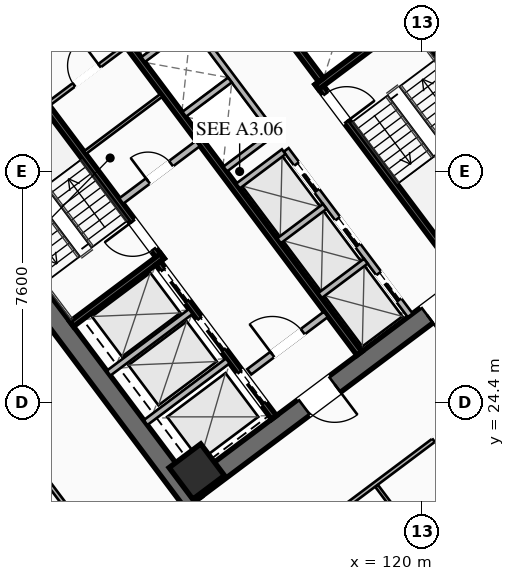
"""IFC4 building model, lengths in metres.
Left out: names, types, materials, properties, quantities, classifications, styles, units other than length and angle.
Written with IfcOpenShell. Run it as: python <this file> out.ifc"""

import sys

from ifc_helpers import new_model, si_unit, direction, frame, frame_2d, origin, origin_2d, place, context, subcontext, project, spatial, rectangle, hollow_rectangle, extrude, element, fill, save


model = new_model("IFC4")
c1 = context("Model", 3, precision=1e-05, world=origin(), true_north=direction((0.0, 1.0)))
c2 = subcontext(c1, "Body", "Model", "MODEL_VIEW")
j1 = project(units=[si_unit("LENGTHUNIT", "METRE"), si_unit("PLANEANGLEUNIT", "RADIAN")], contexts=[c1])
p1 = place(None, origin())
s1 = spatial("IfcSite", under=j1, at=p1, CompositionType="ELEMENT")
p2 = place(p1, origin())
s2 = spatial("IfcBuilding", under=s1, at=p2, CompositionType="ELEMENT")
p3 = place(p2, frame((0.0, 0.0, 42.35)))
s3 = spatial("IfcBuildingStorey", under=s2, at=p3, CompositionType="ELEMENT", Elevation=42.35)
for number, where, z_axis, x_axis in (
    (1, (112.476, 21.107, 0.0), (0.0, 0.0, 1.0), (-0.6, 0.8, 0.0)),
    (2, (115.524, 42.893, 0.0), (0.0, 0.0, 1.0), (0.6, -0.8, 0.0)),
):
    element("IfcWall", number, at=place(p3, frame(where, z_axis=z_axis, x_axis=x_axis)), inside=s3, PredefinedType="SHEAR", context=c2, shape_type="SweptSolid", body=[
        extrude(rectangle(XDim=15.6, YDim=0.65, at=frame_2d((7.8, 0.0))), origin(), (0.0, 0.0, 1.0), 3.55),
    ])
p4 = place(p3, frame((124.429, 30.478, 0.0), z_axis=(0.0, 0.0, 1.0), x_axis=(-0.799998028465, -0.600002628705, 0.0)))
e3 = element("IfcWall", 3, at=p4, inside=s3, PredefinedType="SHEAR", context=c2, shape_type="SweptSolid", body=[
    extrude(rectangle(XDim=14.86, YDim=0.65, at=frame_2d((7.43, 0.0))), origin(), (0.0, 0.0, 1.0), 3.55),
])
p5 = place(p4, frame((9.13, 0.0, 0.0)))
e4 = element("IfcOpeningElement", 4, at=p5, cuts=e3, PredefinedType="OPENING", context=c2, shape_type="SweptSolid", body=[
    extrude(rectangle(XDim=1.25, YDim=2.25, at=frame_2d((0.625, 1.125))), frame((0.0, 0.335, 0.0), z_axis=(0.0, -1.0, 0.0), x_axis=(1.0, 0.0, 0.0)), (0.0, 0.0, 1.0), 0.67),
])
p6 = place(p4, frame((4.08, 0.0, 0.0)))
e5 = element("IfcOpeningElement", 5, at=p6, cuts=e3, PredefinedType="OPENING", context=c2, shape_type="SweptSolid", body=[
    extrude(rectangle(XDim=1.25, YDim=2.25, at=frame_2d((0.625, 1.125))), frame((0.0, 0.335, 0.0), z_axis=(0.0, -1.0, 0.0), x_axis=(1.0, 0.0, 0.0)), (0.0, 0.0, 1.0), 0.67),
])
p7 = place(p3, frame((103.571, 33.522, 0.0), z_axis=(0.0, 0.0, 1.0), x_axis=(0.799998028465, 0.600002628705, 0.0)))
e6 = element("IfcWall", 6, at=p7, inside=s3, PredefinedType="SHEAR", context=c2, shape_type="SweptSolid", body=[
    extrude(rectangle(XDim=14.86, YDim=0.65, at=frame_2d((7.43, 0.0))), origin(), (0.0, 0.0, 1.0), 3.55),
])
p8 = place(p7, frame((4.48, 0.0, 0.0)))
e7 = element("IfcOpeningElement", 7, at=p8, cuts=e6, PredefinedType="OPENING", context=c2, shape_type="SweptSolid", body=[
    extrude(rectangle(XDim=1.25, YDim=2.25, at=frame_2d((0.625, 1.125))), frame((0.0, 0.335, 0.0), z_axis=(0.0, -1.0, 0.0), x_axis=(1.0, 0.0, 0.0)), (0.0, 0.0, 1.0), 0.67),
])
p9 = place(p7, frame((9.53, 0.0, 0.0)))
e8 = element("IfcOpeningElement", 8, at=p9, cuts=e6, PredefinedType="OPENING", context=c2, shape_type="SweptSolid", body=[
    extrude(rectangle(XDim=1.25, YDim=2.25, at=frame_2d((0.625, 1.125))), frame((0.0, 0.335, 0.0), z_axis=(0.0, -1.0, 0.0), x_axis=(1.0, 0.0, 0.0)), (0.0, 0.0, 1.0), 0.67),
])
p10 = place(p3, frame((112.59, 22.13, 0.0), z_axis=(0.0, 0.0, 1.0), x_axis=(0.799999996291, 0.600000004945, 0.0)))
e9 = element("IfcColumn", 9, at=p10, inside=s3, PredefinedType="COLUMN", context=c2, shape_type="SweptSolid", body=[
    extrude(hollow_rectangle(XDim=1.3, YDim=1.3, WallThickness=0.05, at=origin_2d()), origin(), (0.0, 0.0, 1.0), 3.35),
])
p11 = place(p3, frame((111.44, 29.08, 0.0), z_axis=(0.0, 0.0, 1.0), x_axis=(-0.600009827119, 0.799992629566, 0.0)))
e10 = element("IfcWall", 10, at=p11, inside=s3, PredefinedType="SHEAR", context=c2, shape_type="SweptSolid", body=[
    extrude(rectangle(XDim=7.95, YDim=0.2, at=frame_2d((3.975, 0.0))), origin(), (0.0, 0.0, 1.0), 3.35),
])
p12 = place(p11, frame((0.45, 0.0, 0.0)))
e11 = element("IfcOpeningElement", 11, at=p12, cuts=e10, PredefinedType="OPENING", context=c2, shape_type="SweptSolid", body=[
    extrude(rectangle(XDim=1.15, YDim=2.2, at=frame_2d((0.575, 1.1))), frame((0.0, 0.11, 0.0), z_axis=(0.0, -1.0, 0.0), x_axis=(1.0, 0.0, 0.0)), (0.0, 0.0, 1.0), 0.22),
])
p13 = place(p3, frame((108.476, 26.982, 0.0), z_axis=(0.0, 0.0, 1.0), x_axis=(0.799984290658, 0.600020945218, 0.0)))
e12 = element("IfcWall", 12, at=p13, inside=s3, PredefinedType="SHEAR", context=c2, shape_type="SweptSolid", body=[
    extrude(rectangle(XDim=3.73, YDim=0.2, at=frame_2d((1.865, 0.0))), origin(), (0.0, 0.0, 1.0), 3.35),
])
p14 = place(p3, frame((116.56, 34.92, 0.0), z_axis=(0.0, 0.0, 1.0), x_axis=(0.600009827119, -0.799992629566, 0.0)))
e13 = element("IfcWall", 13, at=p14, inside=s3, PredefinedType="SHEAR", context=c2, shape_type="SweptSolid", body=[
    extrude(rectangle(XDim=7.95, YDim=0.2, at=frame_2d((3.975, 0.0))), origin(), (0.0, 0.0, 1.0), 3.35),
])
p15 = place(p14, frame((0.45, 0.0, 0.0)))
e14 = element("IfcOpeningElement", 14, at=p15, cuts=e13, PredefinedType="OPENING", context=c2, shape_type="SweptSolid", body=[
    extrude(rectangle(XDim=1.15, YDim=2.2, at=frame_2d((0.575, 1.1))), frame((0.0, 0.11, 0.0), z_axis=(0.0, -1.0, 0.0), x_axis=(1.0, 0.0, 0.0)), (0.0, 0.0, 1.0), 0.22),
])
p16 = place(p3, frame((116.54, 34.78, 0.0), z_axis=(0.0, 0.0, 1.0), x_axis=(0.799984290658, 0.600020945218, 0.0)))
e15 = element("IfcWall", 15, at=p16, inside=s3, PredefinedType="SHEAR", context=c2, shape_type="SweptSolid", body=[
    extrude(rectangle(XDim=3.73, YDim=0.2, at=frame_2d((1.865, 0.0))), origin(), (0.0, 0.0, 1.0), 3.35),
])
p17 = place(p3, frame((117.938, 26.016, 0.0), z_axis=(0.0, 0.0, 1.0), x_axis=(-0.600005463273, 0.799995902516, 0.0)))
e16 = element("IfcWall", 16, at=p17, inside=s3, PredefinedType="SHEAR", context=c2, shape_type="SweptSolid", body=[
    extrude(rectangle(XDim=14.3, YDim=0.2, at=frame_2d((7.15, 0.0))), origin(), (0.0, 0.0, 1.0), 3.35),
])
p18 = place(p3, frame((110.104, 31.028, 0.0), z_axis=(0.0, 0.0, 1.0), x_axis=(0.800018601094, 0.59997519774, 0.0)))
e17 = element("IfcWall", 17, at=p18, inside=s3, PredefinedType="SOLIDWALL", context=c2, shape_type="SweptSolid", body=[
    extrude(rectangle(XDim=3.15, YDim=0.22, at=frame_2d((1.575, 0.0))), origin(), (0.0, 0.0, 1.0), 2.703),
])
p19 = place(p18, frame((1.1, 0.0, 0.0)))
e18 = element("IfcOpeningElement", 18, at=p19, cuts=e17, PredefinedType="OPENING", context=c2, shape_type="SweptSolid", body=[
    extrude(rectangle(XDim=0.95, YDim=2.05, at=frame_2d((0.475, 1.025))), frame((0.0, 0.12, 0.0), z_axis=(0.0, -1.0, 0.0), x_axis=(1.0, 0.0, 0.0)), (0.0, 0.0, 1.0), 0.24),
])
p20 = place(p3, frame((114.316, 25.412, 0.0), z_axis=(0.0, 0.0, 1.0), x_axis=(0.800018601094, 0.59997519774, 0.0)))
e19 = element("IfcWall", 19, at=p20, inside=s3, PredefinedType="SOLIDWALL", context=c2, shape_type="SweptSolid", body=[
    extrude(rectangle(XDim=3.15, YDim=0.22, at=frame_2d((1.575, 0.0))), origin(), (0.0, 0.0, 1.0), 2.703),
])
p21 = place(p20, frame((0.95, 0.0, 0.0)))
e20 = element("IfcOpeningElement", 20, at=p21, cuts=e19, PredefinedType="OPENING", context=c2, shape_type="SweptSolid", body=[
    extrude(rectangle(XDim=1.25, YDim=2.25, at=frame_2d((0.625, 1.125))), frame((0.0, 0.12, 0.0), z_axis=(0.0, -1.0, 0.0), x_axis=(1.0, 0.0, 0.0)), (0.0, 0.0, 1.0), 0.24),
])
p22 = place(p3, frame((115.13, 23.91, 0.0), z_axis=(0.0, 0.0, 1.0), x_axis=(-0.599975393228, 0.800018454488, 0.0)))
e21 = element("IfcWall", 21, at=p22, inside=s3, PredefinedType="SHEAR", context=c2, shape_type="SweptSolid", body=[
    extrude(rectangle(XDim=6.35, YDim=0.2, at=frame_2d((3.175, 0.0))), origin(), (0.0, 0.0, 1.0), 3.35),
])
p23 = place(p22, frame((4.775, 0.0, 0.0)))
e22 = element("IfcOpeningElement", 22, at=p23, cuts=e21, PredefinedType="OPENING", context=c2, shape_type="SweptSolid", body=[
    extrude(rectangle(XDim=1.3, YDim=2.25, at=frame_2d((0.65, 1.125))), frame((0.0, 0.11, 0.0), z_axis=(0.0, -1.0, 0.0), x_axis=(1.0, 0.0, 0.0)), (0.0, 0.0, 1.0), 0.22),
])
p24 = place(p22, frame((2.775, 0.0, 0.0)))
e23 = element("IfcOpeningElement", 23, at=p24, cuts=e21, PredefinedType="OPENING", context=c2, shape_type="SweptSolid", body=[
    extrude(rectangle(XDim=1.3, YDim=2.25, at=frame_2d((0.65, 1.125))), frame((0.0, 0.11, 0.0), z_axis=(0.0, -1.0, 0.0), x_axis=(1.0, 0.0, 0.0)), (0.0, 0.0, 1.0), 0.22),
])
p25 = place(p22, frame((0.575, 0.0, 0.0)))
e24 = element("IfcOpeningElement", 24, at=p25, cuts=e21, PredefinedType="OPENING", context=c2, shape_type="SweptSolid", body=[
    extrude(rectangle(XDim=1.3, YDim=2.25, at=frame_2d((0.65, 1.125))), frame((0.0, 0.11, 0.0), z_axis=(0.0, -1.0, 0.0), x_axis=(1.0, 0.0, 0.0)), (0.0, 0.0, 1.0), 0.22),
])
for number, where, z_axis, x_axis in (
    (25, (110.906, 23.742, 0.0), (0.0, 0.0, 1.0), (0.8, 0.6, 0.0)),
    (26, (109.688, 25.366, 0.0), (0.0, 0.0, 1.0), (0.8, 0.6, 0.0)),
):
    element("IfcWall", number, at=place(p3, frame(where, z_axis=z_axis, x_axis=x_axis)), inside=s3, PredefinedType="SOLIDWALL", context=c2, shape_type="SweptSolid", body=[
        extrude(rectangle(XDim=3.38, YDim=0.2, at=frame_2d((1.69, 0.0))), origin(), (0.0, 0.0, 1.0), 3.35),
    ])
p26 = place(p3, frame((112.87, 40.09, 0.0), z_axis=(0.0, 0.0, 1.0), x_axis=(0.599975393228, -0.800018454488, 0.0)))
e27 = element("IfcWall", 27, at=p26, inside=s3, PredefinedType="SHEAR", context=c2, shape_type="SweptSolid", body=[
    extrude(rectangle(XDim=6.35, YDim=0.2, at=frame_2d((3.175, 0.0))), origin(), (0.0, 0.0, 1.0), 3.35),
])
p27 = place(p3, frame((107.71, 34.22, 0.0), z_axis=(0.0, 0.0, 1.0), x_axis=(0.799981399002, 0.60002480053, 0.0)))
e28 = element("IfcWall", 28, at=p27, inside=s3, PredefinedType="PARTITIONING", context=c2, shape_type="SweptSolid", body=[
    extrude(rectangle(XDim=3.15, YDim=0.135, at=frame_2d((1.575, 0.0))), origin(), (0.0, 0.0, 1.0), 2.703),
])
p28 = place(p27, frame((1.05, 0.0, 0.0)))
e29 = element("IfcOpeningElement", 29, at=p28, cuts=e28, PredefinedType="OPENING", context=c2, shape_type="SweptSolid", body=[
    extrude(rectangle(XDim=1.05, YDim=2.2, at=frame_2d((0.525, 1.1))), frame((0.0, 0.077, 0.0), z_axis=(0.0, -1.0, 0.0), x_axis=(1.0, 0.0, 0.0)), (0.0, 0.0, 1.0), 0.155),
])
p29 = place(p3, frame((108.91, 32.62, 0.0), z_axis=(0.0, 0.0, 1.0), x_axis=(0.800018601094, 0.59997519774, 0.0)))
e30 = element("IfcWall", 30, at=p29, inside=s3, PredefinedType="PARTITIONING", context=c2, shape_type="SweptSolid", body=[
    extrude(rectangle(XDim=3.15, YDim=0.11, at=frame_2d((1.575, 0.0))), origin(), (0.0, 0.0, 1.0), 2.703),
])
p30 = place(p3, frame((119.61, 27.27, 0.0), z_axis=(0.0, 0.0, 1.0), x_axis=(-0.600011488909, 0.79999138319, 0.0)))
e31 = element("IfcWall", 31, at=p30, inside=s3, PredefinedType="SOLIDWALL", context=c2, shape_type="SweptSolid", body=[
    extrude(rectangle(XDim=6.8, YDim=0.2, at=frame_2d((3.4, 0.0))), origin(), (0.0, 0.0, 1.0), 3.35),
])
p31 = place(p30, frame((0.625, 0.0, 0.0)))
e32 = element("IfcOpeningElement", 32, at=p31, cuts=e31, PredefinedType="OPENING", context=c2, shape_type="SweptSolid", body=[
    extrude(rectangle(XDim=1.1, YDim=2.2, at=frame_2d((0.55, 1.1))), frame((0.0, 0.11, 0.0), z_axis=(0.0, -1.0, 0.0), x_axis=(1.0, 0.0, 0.0)), (0.0, 0.0, 1.0), 0.22),
])
p32 = place(p30, frame((2.875, 0.0, 0.0)))
e33 = element("IfcOpeningElement", 33, at=p32, cuts=e31, PredefinedType="OPENING", context=c2, shape_type="SweptSolid", body=[
    extrude(rectangle(XDim=1.1, YDim=2.2, at=frame_2d((0.55, 1.1))), frame((0.0, 0.11, 0.0), z_axis=(0.0, -1.0, 0.0), x_axis=(1.0, 0.0, 0.0)), (0.0, 0.0, 1.0), 0.22),
])
p33 = place(p30, frame((5.125, 0.0, 0.0)))
e34 = element("IfcOpeningElement", 34, at=p33, cuts=e31, PredefinedType="OPENING", context=c2, shape_type="SweptSolid", body=[
    extrude(rectangle(XDim=1.1, YDim=2.2, at=frame_2d((0.55, 1.1))), frame((0.0, 0.11, 0.0), z_axis=(0.0, -1.0, 0.0), x_axis=(1.0, 0.0, 0.0)), (0.0, 0.0, 1.0), 0.22),
])
p34 = place(p3, frame((116.646, 27.922, 0.0), z_axis=(0.0, 0.0, 1.0), x_axis=(0.8, 0.6, 0.0)))
e35 = element("IfcWall", 35, at=p34, inside=s3, PredefinedType="SOLIDWALL", context=c2, shape_type="SweptSolid", body=[
    extrude(rectangle(XDim=1.88, YDim=0.2, at=frame_2d((0.94, 0.0))), origin(), (0.0, 0.0, 1.0), 3.35),
])
p35 = place(p3, frame((115.296, 29.722, 0.0), z_axis=(0.0, 0.0, 1.0), x_axis=(0.799984418148, 0.600020775241, 0.0)))
e36 = element("IfcWall", 36, at=p35, inside=s3, PredefinedType="SOLIDWALL", context=c2, shape_type="SweptSolid", body=[
    extrude(rectangle(XDim=1.88, YDim=0.2, at=frame_2d((0.94, 0.0))), origin(), (0.0, 0.0, 1.0), 3.35),
])
p36 = place(p3, frame((113.946, 31.522, 0.0), z_axis=(0.0, 0.0, 1.0), x_axis=(0.8, 0.6, 0.0)))
e37 = element("IfcWall", 37, at=p36, inside=s3, PredefinedType="SOLIDWALL", context=c2, shape_type="SweptSolid", body=[
    extrude(rectangle(XDim=1.88, YDim=0.2, at=frame_2d((0.94, 0.0))), origin(), (0.0, 0.0, 1.0), 3.35),
])
p37 = place(p3, frame((115.11, 33.27, 0.0), z_axis=(0.0, 0.0, 1.0), x_axis=(-0.600011488909, 0.79999138319, 0.0)))
e38 = element("IfcWall", 38, at=p37, inside=s3, PredefinedType="SOLIDWALL", context=c2, shape_type="SweptSolid", body=[
    extrude(rectangle(XDim=6.8, YDim=0.2, at=frame_2d((3.4, 0.0))), origin(), (0.0, 0.0, 1.0), 3.35),
])
p38 = place(p3, frame((113.526, 32.082, 0.0), z_axis=(0.0, 0.0, 1.0), x_axis=(0.800046745961, 0.599937666993, 0.0)))
e39 = element("IfcWall", 39, at=p38, inside=s3, PredefinedType="SOLIDWALL", context=c2, shape_type="SweptSolid", body=[
    extrude(rectangle(XDim=1.88, YDim=0.2, at=frame_2d((0.94, 0.0))), origin(), (0.0, 0.0, 1.0), 3.35),
])
p39 = place(p3, frame((112.176, 33.882, 0.0), z_axis=(0.0, 0.0, 1.0), x_axis=(0.8, 0.6, 0.0)))
e40 = element("IfcWall", 40, at=p39, inside=s3, PredefinedType="SOLIDWALL", context=c2, shape_type="SweptSolid", body=[
    extrude(rectangle(XDim=1.88, YDim=0.2, at=frame_2d((0.94, 0.0))), origin(), (0.0, 0.0, 1.0), 3.35),
])
p40 = place(p3, frame((110.826, 35.682, 0.0), z_axis=(0.0, 0.0, 1.0), x_axis=(0.799984418148, 0.600020775241, 0.0)))
e41 = element("IfcWall", 41, at=p40, inside=s3, PredefinedType="SOLIDWALL", context=c2, shape_type="SweptSolid", body=[
    extrude(rectangle(XDim=1.88, YDim=0.2, at=frame_2d((0.94, 0.0))), origin(), (0.0, 0.0, 1.0), 3.35),
])
p41 = place(p3, frame((98.084, 34.588, 0.0), z_axis=(0.0, 0.0, 1.0), x_axis=(0.799997053619, 0.600003928488, 0.0)))
e42 = element("IfcWall", 42, at=p41, inside=s3, PredefinedType="PARTITIONING", context=c2, shape_type="SweptSolid", body=[
    extrude(rectangle(XDim=29.83, YDim=0.135, at=frame_2d((14.915, 0.0))), origin(), (0.0, 0.0, 1.0), 2.703),
])
p42 = place(p41, frame((0.3, 0.0, 0.0)))
e43 = element("IfcOpeningElement", 43, at=p42, cuts=e42, PredefinedType="OPENING", context=c2, shape_type="SweptSolid", body=[
    extrude(rectangle(XDim=0.95, YDim=2.05, at=frame_2d((0.475, 1.025))), frame((0.0, 0.077, 0.0), z_axis=(0.0, -1.0, 0.0), x_axis=(1.0, 0.0, 0.0)), (0.0, 0.0, 1.0), 0.155),
])
p43 = place(p41, frame((28.58, 0.0, 0.0)))
e44 = element("IfcOpeningElement", 44, at=p43, cuts=e42, PredefinedType="OPENING", context=c2, shape_type="SweptSolid", body=[
    extrude(rectangle(XDim=0.95, YDim=2.05, at=frame_2d((0.475, 1.025))), frame((0.0, 0.077, 0.0), z_axis=(0.0, -1.0, 0.0), x_axis=(1.0, 0.0, 0.0)), (0.0, 0.0, 1.0), 0.155),
])
p44 = place(p3, frame((135.46, 34.47, 0.0), z_axis=(0.0, 0.0, 1.0), x_axis=(-0.800000982127, -0.599998690494, 0.0)))
e45 = element("IfcWall", 45, at=p44, inside=s3, PredefinedType="PARTITIONING", context=c2, shape_type="SweptSolid", body=[
    extrude(rectangle(XDim=29.83, YDim=0.135, at=frame_2d((14.915, 0.0))), origin(), (0.0, 0.0, 1.0), 2.703),
])
p45 = place(p44, frame((28.5, 0.0, 0.0)))
e46 = element("IfcOpeningElement", 46, at=p45, cuts=e45, PredefinedType="OPENING", context=c2, shape_type="SweptSolid", body=[
    extrude(rectangle(XDim=0.95, YDim=2.05, at=frame_2d((0.475, 1.025))), frame((0.0, 0.077, 0.0), z_axis=(0.0, -1.0, 0.0), x_axis=(1.0, 0.0, 0.0)), (0.0, 0.0, 1.0), 0.155),
])
p46 = place(p44, frame((17.901, 0.0, 0.0)))
e47 = element("IfcOpeningElement", 47, at=p46, cuts=e45, PredefinedType="OPENING", context=c2, shape_type="SweptSolid", body=[
    extrude(rectangle(XDim=0.95, YDim=2.05, at=frame_2d((0.475, 1.025))), frame((0.0, 0.077, 0.0), z_axis=(0.0, -1.0, 0.0), x_axis=(1.0, 0.0, 0.0)), (0.0, 0.0, 1.0), 0.155),
])
p47 = place(p44, frame((13.92, 0.0, 0.0)))
e48 = element("IfcOpeningElement", 48, at=p47, cuts=e45, PredefinedType="OPENING", context=c2, shape_type="SweptSolid", body=[
    extrude(rectangle(XDim=0.95, YDim=2.05, at=frame_2d((0.475, 1.025))), frame((0.0, 0.077, 0.0), z_axis=(0.0, -1.0, 0.0), x_axis=(1.0, 0.0, 0.0)), (0.0, 0.0, 1.0), 0.155),
])
p48 = place(p44, frame((0.38, 0.0, 0.0)))
e49 = element("IfcOpeningElement", 49, at=p48, cuts=e45, PredefinedType="OPENING", context=c2, shape_type="SweptSolid", body=[
    extrude(rectangle(XDim=0.95, YDim=2.05, at=frame_2d((0.475, 1.025))), frame((0.0, 0.077, 0.0), z_axis=(0.0, -1.0, 0.0), x_axis=(1.0, 0.0, 0.0)), (0.0, 0.0, 1.0), 0.155),
])
p49 = place(p3, frame((124.928, 13.096, 0.0), z_axis=(0.0, 0.0, 1.0), x_axis=(-0.599992698573, 0.800005476018, 0.0)))
e50 = element("IfcWall", 50, at=p49, inside=s3, PredefinedType="PARTITIONING", context=c2, shape_type="SweptSolid", body=[
    extrude(rectangle(XDim=10.7, YDim=0.11, at=frame_2d((5.35, 0.0))), origin(), (0.0, 0.0, 1.0), 2.703),
])
p50 = place(p3, frame((111.548, 16.636, 0.0), z_axis=(0.0, 0.0, 1.0), x_axis=(-0.600001746983, 0.79999868976, 0.0)))
e51 = element("IfcWall", 51, at=p50, inside=s3, PredefinedType="PARTITIONING", context=c2, shape_type="SweptSolid", body=[
    extrude(rectangle(XDim=22.36, YDim=0.135, at=frame_2d((11.18, 0.0))), origin(), (0.0, 0.0, 1.0), 2.703),
])
p51 = place(p50, frame((21.11, 0.0, 0.0)))
e52 = element("IfcOpeningElement", 52, at=p51, cuts=e51, PredefinedType="OPENING", context=c2, shape_type="SweptSolid", body=[
    extrude(rectangle(XDim=0.95, YDim=2.05, at=frame_2d((0.475, 1.025))), frame((0.0, 0.077, 0.0), z_axis=(0.0, -1.0, 0.0), x_axis=(1.0, 0.0, 0.0)), (0.0, 0.0, 1.0), 0.155),
])
p52 = place(p5, origin())
e53 = element("IfcDoor", 53, at=p52, inside=s3, OperationType="SINGLE_SWING_LEFT", PredefinedType="DOOR", context=c2, shape_type="SweptSolid", body=[
    extrude(rectangle(XDim=1.25, YDim=2.25, at=frame_2d((0.625, 1.125))), frame((0.0, 0.025, 0.0), z_axis=(0.0, -1.0, 0.0), x_axis=(1.0, 0.0, 0.0)), (0.0, 0.0, 1.0), 0.05),
])
fill(e4, e53)
p53 = place(p6, origin())
e54 = element("IfcDoor", 54, at=p53, inside=s3, OperationType="SINGLE_SWING_RIGHT", PredefinedType="DOOR", context=c2, shape_type="SweptSolid", body=[
    extrude(rectangle(XDim=1.25, YDim=2.25, at=frame_2d((0.625, 1.125))), frame((0.0, 0.025, 0.0), z_axis=(0.0, -1.0, 0.0), x_axis=(1.0, 0.0, 0.0)), (0.0, 0.0, 1.0), 0.05),
])
fill(e5, e54)
p54 = place(p12, origin())
e55 = element("IfcDoor", 55, at=p54, inside=s3, OperationType="SINGLE_SWING_RIGHT", PredefinedType="DOOR", context=c2, shape_type="SweptSolid", body=[
    extrude(rectangle(XDim=1.15, YDim=2.2, at=frame_2d((0.575, 1.1))), frame((0.0, 0.025, 0.0), z_axis=(0.0, -1.0, 0.0), x_axis=(1.0, 0.0, 0.0)), (0.0, 0.0, 1.0), 0.05),
])
fill(e11, e55)
p55 = place(p15, origin())
e56 = element("IfcDoor", 56, at=p55, inside=s3, OperationType="SINGLE_SWING_RIGHT", PredefinedType="DOOR", context=c2, shape_type="SweptSolid", body=[
    extrude(rectangle(XDim=1.15, YDim=2.2, at=frame_2d((0.575, 1.1))), frame((0.0, 0.025, 0.0), z_axis=(0.0, -1.0, 0.0), x_axis=(1.0, 0.0, 0.0)), (0.0, 0.0, 1.0), 0.05),
])
fill(e14, e56)
p56 = place(p21, origin())
e57 = element("IfcDoor", 57, at=p56, inside=s3, OperationType="SINGLE_SWING_LEFT", PredefinedType="DOOR", context=c2, shape_type="SweptSolid", body=[
    extrude(rectangle(XDim=1.25, YDim=2.25, at=frame_2d((0.625, 1.125))), frame((0.0, 0.025, 0.0), z_axis=(0.0, -1.0, 0.0), x_axis=(1.0, 0.0, 0.0)), (0.0, 0.0, 1.0), 0.05),
])
fill(e20, e57)
p57 = place(p28, origin())
e58 = element("IfcDoor", 58, at=p57, inside=s3, OperationType="SINGLE_SWING_RIGHT", PredefinedType="DOOR", context=c2, shape_type="SweptSolid", body=[
    extrude(rectangle(XDim=1.05, YDim=2.2, at=frame_2d((0.525, 1.1))), frame((0.0, 0.025, 0.0), z_axis=(0.0, -1.0, 0.0), x_axis=(1.0, 0.0, 0.0)), (0.0, 0.0, 1.0), 0.05),
])
fill(e29, e58)
p58 = place(p19, origin())
e59 = element("IfcDoor", 59, at=p58, inside=s3, OperationType="SINGLE_SWING_LEFT", PredefinedType="DOOR", context=c2, shape_type="SweptSolid", body=[
    extrude(rectangle(XDim=0.95, YDim=2.05, at=frame_2d((0.475, 1.025))), frame((0.0, 0.025, 0.0), z_axis=(0.0, -1.0, 0.0), x_axis=(1.0, 0.0, 0.0)), (0.0, 0.0, 1.0), 0.05),
])
fill(e18, e59)
p59 = place(p46, origin())
e60 = element("IfcDoor", 60, at=p59, inside=s3, OperationType="SINGLE_SWING_LEFT", PredefinedType="DOOR", context=c2, shape_type="SweptSolid", body=[
    extrude(rectangle(XDim=0.95, YDim=2.05, at=frame_2d((0.475, 1.025))), frame((0.0, 0.025, 0.0), z_axis=(0.0, -1.0, 0.0), x_axis=(1.0, 0.0, 0.0)), (0.0, 0.0, 1.0), 0.05),
])
fill(e47, e60)
p60 = place(p23, origin())
e61 = element("IfcDoor", 61, at=p60, inside=s3, OperationType="SLIDING_TO_LEFT", PredefinedType="DOOR", context=c2, shape_type="SweptSolid", body=[
    extrude(rectangle(XDim=1.3, YDim=2.25, at=frame_2d((0.65, 1.125))), frame((0.0, 0.025, 0.0), z_axis=(0.0, -1.0, 0.0), x_axis=(1.0, 0.0, 0.0)), (0.0, 0.0, 1.0), 0.05),
])
fill(e22, e61)
p61 = place(p24, origin())
e62 = element("IfcDoor", 62, at=p61, inside=s3, OperationType="SLIDING_TO_LEFT", PredefinedType="DOOR", context=c2, shape_type="SweptSolid", body=[
    extrude(rectangle(XDim=1.3, YDim=2.25, at=frame_2d((0.65, 1.125))), frame((0.0, 0.025, 0.0), z_axis=(0.0, -1.0, 0.0), x_axis=(1.0, 0.0, 0.0)), (0.0, 0.0, 1.0), 0.05),
])
fill(e23, e62)
p62 = place(p25, origin())
e63 = element("IfcDoor", 63, at=p62, inside=s3, OperationType="SLIDING_TO_LEFT", PredefinedType="DOOR", context=c2, shape_type="SweptSolid", body=[
    extrude(rectangle(XDim=1.3, YDim=2.25, at=frame_2d((0.65, 1.125))), frame((0.0, 0.025, 0.0), z_axis=(0.0, -1.0, 0.0), x_axis=(1.0, 0.0, 0.0)), (0.0, 0.0, 1.0), 0.05),
])
fill(e24, e63)
p63 = place(p31, origin())
e64 = element("IfcDoor", 64, at=p63, inside=s3, OperationType="SLIDING_TO_LEFT", PredefinedType="DOOR", context=c2, shape_type="SweptSolid", body=[
    extrude(rectangle(XDim=1.1, YDim=2.2, at=frame_2d((0.55, 1.1))), frame((0.0, 0.025, 0.0), z_axis=(0.0, -1.0, 0.0), x_axis=(1.0, 0.0, 0.0)), (0.0, 0.0, 1.0), 0.05),
])
fill(e32, e64)
p64 = place(p32, origin())
e65 = element("IfcDoor", 65, at=p64, inside=s3, OperationType="SLIDING_TO_LEFT", PredefinedType="DOOR", context=c2, shape_type="SweptSolid", body=[
    extrude(rectangle(XDim=1.1, YDim=2.2, at=frame_2d((0.55, 1.1))), frame((0.0, 0.025, 0.0), z_axis=(0.0, -1.0, 0.0), x_axis=(1.0, 0.0, 0.0)), (0.0, 0.0, 1.0), 0.05),
])
fill(e33, e65)
p65 = place(p33, origin())
e66 = element("IfcDoor", 66, at=p65, inside=s3, OperationType="SLIDING_TO_LEFT", PredefinedType="DOOR", context=c2, shape_type="SweptSolid", body=[
    extrude(rectangle(XDim=1.1, YDim=2.2, at=frame_2d((0.55, 1.1))), frame((0.0, 0.025, 0.0), z_axis=(0.0, -1.0, 0.0), x_axis=(1.0, 0.0, 0.0)), (0.0, 0.0, 1.0), 0.05),
])
fill(e34, e66)
save(model, sys.argv[1])
